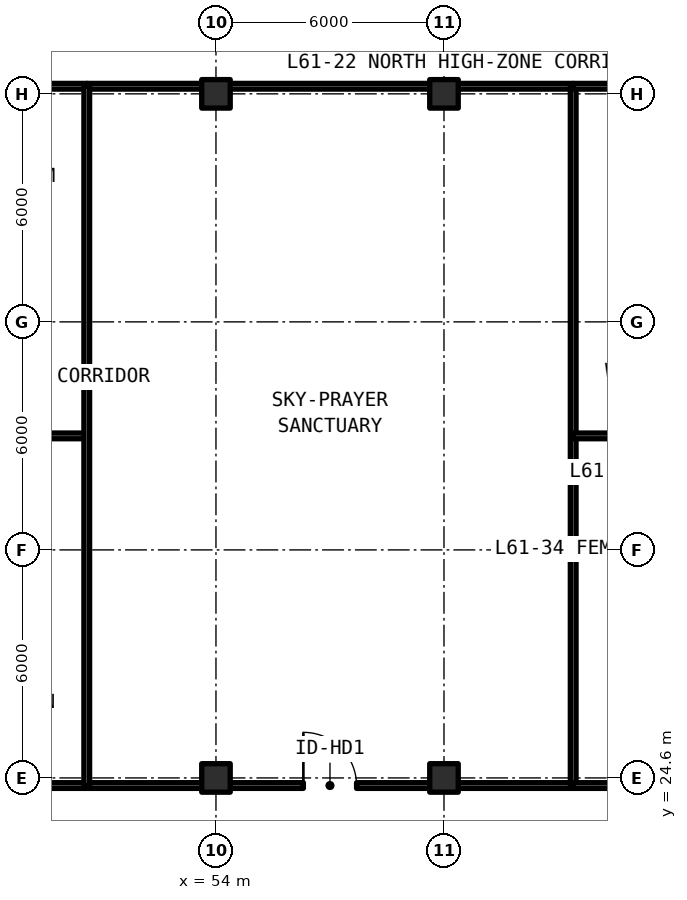
"""IFC4 building model, lengths in metres.
Left out: names, types, materials, properties, quantities, classifications, styles, units other than length and angle.
Written with IfcOpenShell. Run it as: python <this file> out.ifc"""

import sys

from ifc_helpers import new_model, si_unit, direction, frame, frame_2d, origin, origin_2d, place, context, subcontext, project, spatial, rectangle, extrude, element, fill, save


model = new_model("IFC4")
c1 = context("Model", 3, precision=1e-05, world=origin(), true_north=direction((0.0, 1.0)))
c2 = subcontext(c1, "Body", "Model", "MODEL_VIEW")
j1 = project(units=[si_unit("LENGTHUNIT", "METRE"), si_unit("PLANEANGLEUNIT", "RADIAN")], contexts=[c1])
p1 = place(None, origin())
s1 = spatial("IfcSite", under=j1, at=p1, CompositionType="ELEMENT")
p2 = place(p1, origin())
s2 = spatial("IfcBuilding", under=s1, at=p2, CompositionType="ELEMENT")
p3 = place(p2, frame((0.0, 0.0, 219.12)))
s3 = spatial("IfcBuildingStorey", under=s2, at=p3, CompositionType="ELEMENT", Elevation=219.12)
for number, where, z_axis, x_axis in (
    (1, (54.0, 24.6, 0.0), (0.0, 0.0, 1.0), (1.0, 0.0, 0.0)),
    (2, (54.0, 42.6, 0.0), (0.0, 0.0, 1.0), (1.0, 0.0, 0.0)),
    (3, (60.0, 24.6, 0.0), (0.0, 0.0, 1.0), (1.0, 0.0, 0.0)),
    (4, (60.0, 42.6, 0.0), (0.0, 0.0, 1.0), (1.0, 0.0, 0.0)),
):
    element("IfcColumn", number, at=place(p3, frame(where, z_axis=z_axis, x_axis=x_axis)), inside=s3, PredefinedType="COLUMN", context=c2, shape_type="SweptSolid", body=[
        extrude(rectangle(XDim=0.75, YDim=0.75, at=origin_2d()), origin(), (0.0, 0.0, 1.0), 3.63),
    ])
for number, where, z_axis, x_axis in (
    (5, (46.55, 24.4, 0.0), (0.0, 0.0, 1.0), (1.0, 0.0, 0.0)),
    (6, (46.55, 33.6, 0.0), (0.0, 0.0, 1.0), (1.0, 0.0, 0.0)),
    (7, (46.55, 42.8, 0.0), (0.0, 0.0, 1.0), (1.0, 0.0, 0.0)),
):
    element("IfcWall", number, at=place(p3, frame(where, z_axis=z_axis, x_axis=x_axis)), inside=s3, PredefinedType="SOLIDWALL", context=c2, shape_type="SweptSolid", body=[
        extrude(rectangle(XDim=4.05, YDim=0.15, at=frame_2d((2.025, 0.0))), origin(), (0.0, 0.0, 1.0), 2.63),
    ])
p4 = place(p3, frame((50.6, 24.4, 0.0), z_axis=(0.0, 0.0, 1.0), x_axis=(1.0, 0.0, 0.0)))
e8 = element("IfcWall", 8, at=p4, inside=s3, PredefinedType="SOLIDWALL", context=c2, shape_type="SweptSolid", body=[
    extrude(rectangle(XDim=12.8, YDim=0.15, at=frame_2d((6.4, 0.0))), origin(), (0.0, 0.0, 1.0), 2.63),
])
p5 = place(p4, frame((5.7, 0.0, 0.0)))
e9 = element("IfcOpeningElement", 9, at=p5, cuts=e8, PredefinedType="OPENING", context=c2, shape_type="SweptSolid", body=[
    extrude(rectangle(XDim=1.4, YDim=2.15, at=frame_2d((0.7, 1.075))), frame((0.0, 0.085, 0.0), z_axis=(0.0, -1.0, 0.0), x_axis=(1.0, 0.0, 0.0)), (0.0, 0.0, 1.0), 0.17),
])
p6 = place(p3, frame((50.6, 42.8, 0.0), z_axis=(0.0, 0.0, 1.0), x_axis=(1.0, 0.0, 0.0)))
e10 = element("IfcWall", 10, at=p6, inside=s3, PredefinedType="SOLIDWALL", context=c2, shape_type="SweptSolid", body=[
    extrude(rectangle(XDim=12.8, YDim=0.15, at=frame_2d((6.4, 0.0))), origin(), (0.0, 0.0, 1.0), 2.63),
])
for number, where, z_axis, x_axis in (
    (11, (50.6, 24.4, 0.0), (0.0, 0.0, 1.0), (0.0, 1.0, 0.0)),
    (12, (63.4, 24.4, 0.0), (0.0, 0.0, 1.0), (0.0, 1.0, 0.0)),
):
    element("IfcWall", number, at=place(p3, frame(where, z_axis=z_axis, x_axis=x_axis)), inside=s3, PredefinedType="SOLIDWALL", context=c2, shape_type="SweptSolid", body=[
        extrude(rectangle(XDim=18.4, YDim=0.15, at=frame_2d((9.2, 0.0))), origin(), (0.0, 0.0, 1.0), 2.63),
    ])
for number, where, z_axis, x_axis in (
    (13, (63.4, 24.4, 0.0), (0.0, 0.0, 1.0), (1.0, 0.0, 0.0)),
    (14, (63.4, 33.6, 0.0), (0.0, 0.0, 1.0), (1.0, 0.0, 0.0)),
    (15, (63.4, 42.8, 0.0), (0.0, 0.0, 1.0), (1.0, 0.0, 0.0)),
):
    element("IfcWall", number, at=place(p3, frame(where, z_axis=z_axis, x_axis=x_axis)), inside=s3, PredefinedType="SOLIDWALL", context=c2, shape_type="SweptSolid", body=[
        extrude(rectangle(XDim=4.05, YDim=0.15, at=frame_2d((2.025, 0.0))), origin(), (0.0, 0.0, 1.0), 2.63),
    ])
p7 = place(p5, origin())
e16 = element("IfcDoor", 16, at=p7, inside=s3, OperationType="SINGLE_SWING_RIGHT", PredefinedType="DOOR", context=c2, shape_type="SweptSolid", body=[
    extrude(rectangle(XDim=1.4, YDim=2.15, at=frame_2d((0.7, 1.075))), frame((0.0, 0.025, 0.0), z_axis=(0.0, -1.0, 0.0), x_axis=(1.0, 0.0, 0.0)), (0.0, 0.0, 1.0), 0.05),
])
fill(e9, e16)
save(model, sys.argv[1])
